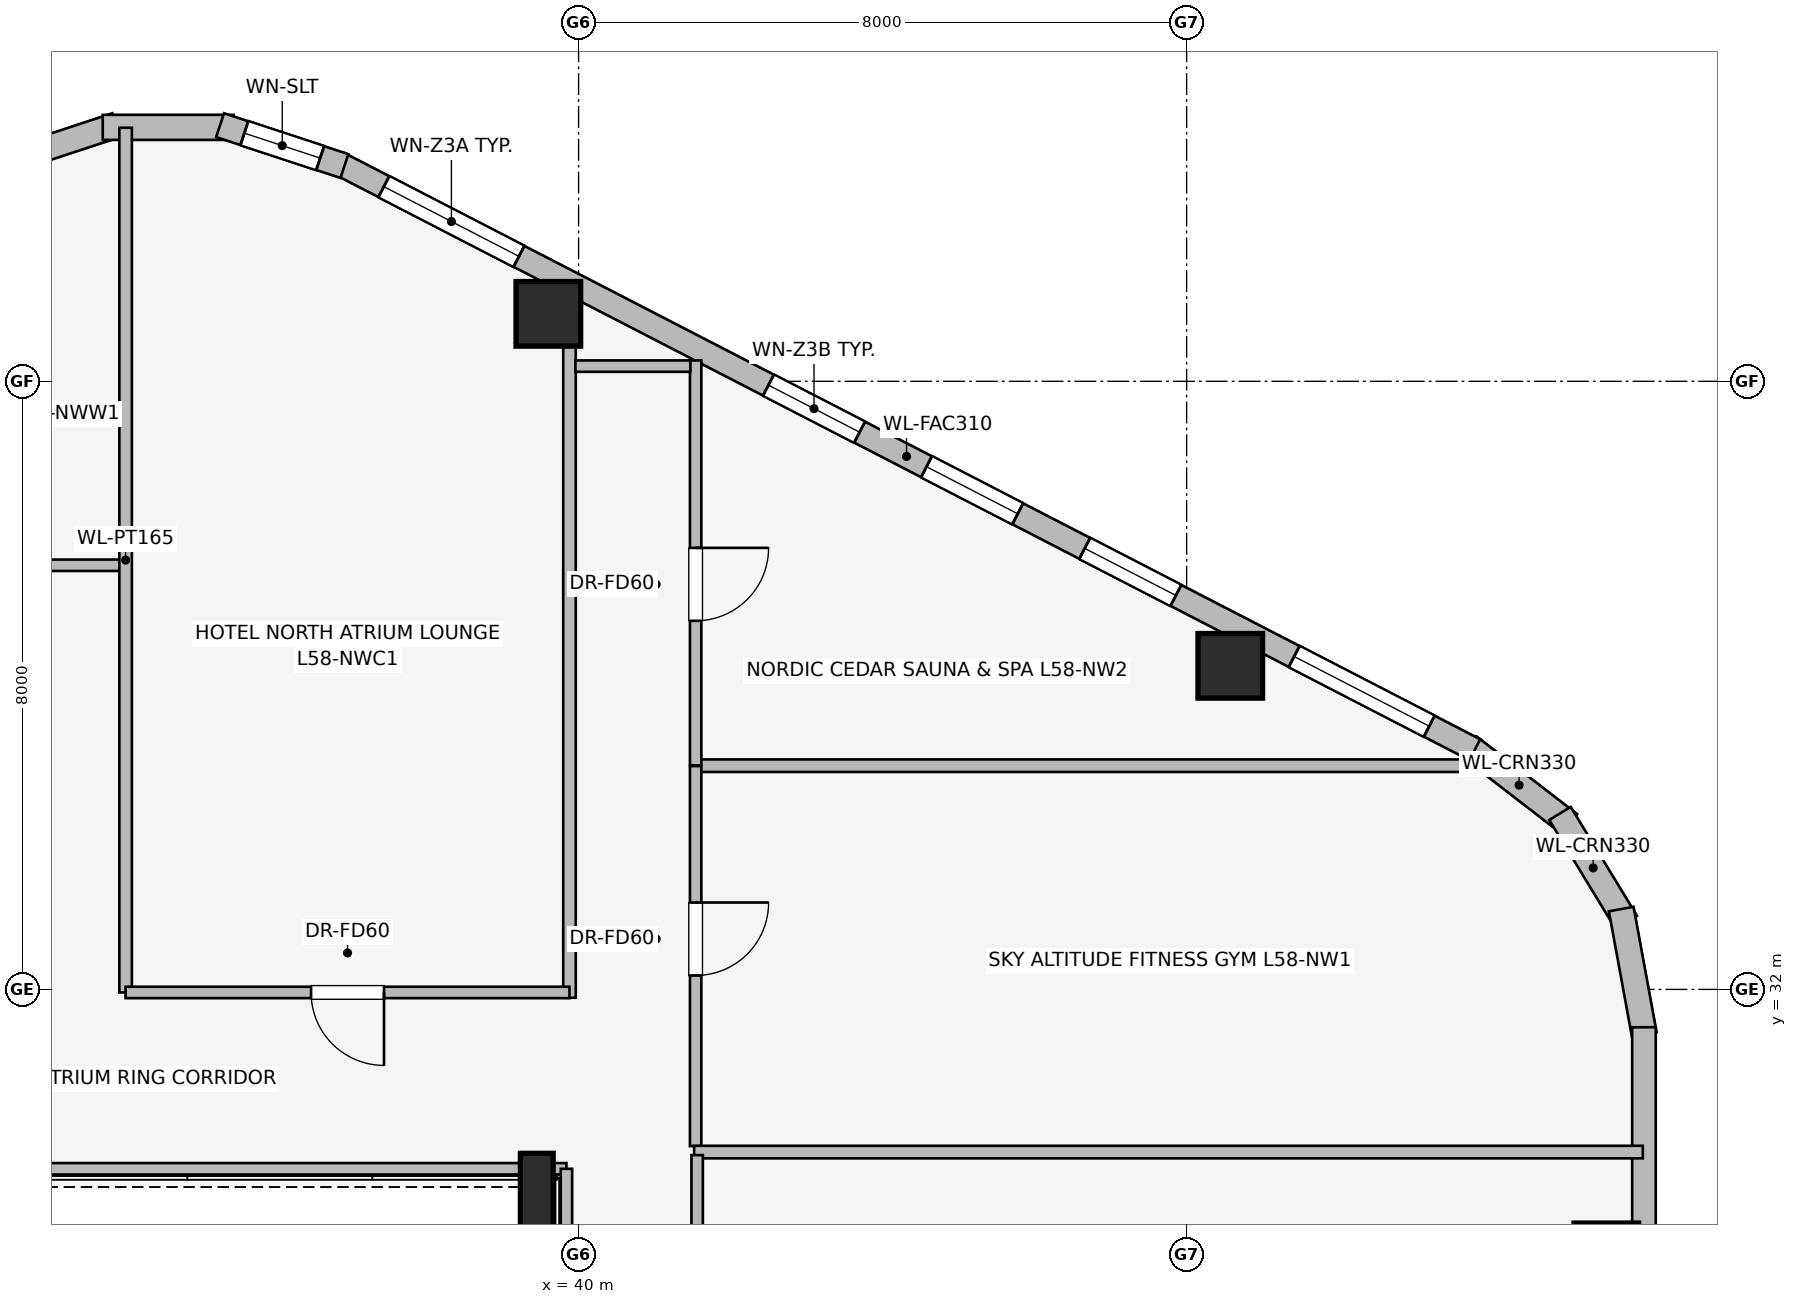
"""IFC4 building model, lengths in metres.
Left out: names, types, materials, properties, quantities, classifications, styles, units other than length and angle.
Written with IfcOpenShell. Run it as: python <this file> out.ifc"""

import sys

from ifc_helpers import new_model, si_unit, direction, frame, frame_2d, origin, origin_2d, place, context, subcontext, project, spatial, rectangle, i_section, extrude, element, fill, save


model = new_model("IFC4")
c1 = context("Model", 3, precision=1e-05, world=origin(), true_north=direction((0.0, 1.0)))
c2 = subcontext(c1, "Body", "Model", "MODEL_VIEW")
j1 = project(units=[si_unit("LENGTHUNIT", "METRE"), si_unit("PLANEANGLEUNIT", "RADIAN")], contexts=[c1])
p1 = place(None, origin())
s1 = spatial("IfcSite", under=j1, at=p1, CompositionType="ELEMENT")
p2 = place(p1, origin())
s2 = spatial("IfcBuilding", under=s1, at=p2, CompositionType="ELEMENT")
p3 = place(p2, frame((0.0, 0.0, 213.7)))
s3 = spatial("IfcBuildingStorey", under=s2, at=p3, CompositionType="ELEMENT", Elevation=213.7)
for number, where, z_axis, x_axis in (
    (1, (48.574, 36.257, 0.0), (0.0, 0.0, 1.0), (1.0, 0.0, 0.0)),
    (2, (39.602, 40.888, 0.0), (0.0, 0.0, 1.0), (1.0, 0.0, 0.0)),
    (3, (53.522, 28.501, 0.0), (0.0, 0.0, 1.0), (1.0, 0.0, 0.0)),
):
    element("IfcColumn", number, at=place(p3, frame(where, z_axis=z_axis, x_axis=x_axis)), inside=s3, PredefinedType="COLUMN", context=c2, shape_type="SweptSolid", body=[
        extrude(rectangle(XDim=0.85, YDim=0.85, at=origin_2d()), origin(), (0.0, 0.0, 1.0), 3.45),
    ])
p4 = place(p3, frame((39.45, 29.35, 0.0), z_axis=(0.0, 0.0, 1.0), x_axis=(1.0, 0.0, 0.0)))
e4 = element("IfcColumn", 4, at=p4, inside=s3, PredefinedType="COLUMN", context=c2, shape_type="SweptSolid", body=[
    extrude(i_section(OverallWidth=0.431, OverallDepth=0.987, WebThickness=0.034, FlangeThickness=0.062, at=origin_2d()), origin(), (0.0, 0.0, 1.0), 3.45),
])
p5 = place(p3, frame((51.711, 35.2, 0.0), z_axis=(0.0, 0.0, 1.0), x_axis=(0.791464279355, -0.611215423976, 0.0)))
e5 = element("IfcWall", 5, at=p5, inside=s3, PredefinedType="STANDARD", context=c2, shape_type="SweptSolid", body=[
    extrude(rectangle(XDim=1.677, YDim=0.33, at=frame_2d((0.838, 0.0))), origin(), (0.0, 0.0, 1.0), 3.19),
])
p6 = place(p3, frame((52.912, 34.315, 0.0), z_axis=(0.0, 0.0, 1.0), x_axis=(0.520219286058, -0.85403272444, 0.0)))
e6 = element("IfcWall", 6, at=p6, inside=s3, PredefinedType="STANDARD", context=c2, shape_type="SweptSolid", body=[
    extrude(rectangle(XDim=1.678, YDim=0.33, at=frame_2d((0.839, 0.0))), origin(), (0.0, 0.0, 1.0), 3.19),
])
p7 = place(p3, frame((53.718, 33.057, 0.0), z_axis=(0.0, 0.0, 1.0), x_axis=(0.180717642671, -0.983535019014, 0.0)))
e7 = element("IfcWall", 7, at=p7, inside=s3, PredefinedType="STANDARD", context=c2, shape_type="SweptSolid", body=[
    extrude(rectangle(XDim=1.677, YDim=0.33, at=frame_2d((0.838, 0.0))), origin(), (0.0, 0.0, 1.0), 3.19),
])
p8 = place(p3, frame((36.838, 42.871, 0.0), z_axis=(0.0, 0.0, 1.0), x_axis=(0.888626188278, -0.458632202867, 0.0)))
e8 = element("IfcWall", 8, at=p8, inside=s3, PredefinedType="STANDARD", context=c2, shape_type="SweptSolid", body=[
    extrude(rectangle(XDim=16.828, YDim=0.31, at=frame_2d((8.414, 0.0))), origin(), (0.0, 0.0, 1.0), 3.19),
])
p9 = place(p8, frame((0.675, 0.0, 0.75)))
e9 = element("IfcOpeningElement", 9, at=p9, cuts=e8, PredefinedType="OPENING", context=c2, shape_type="SweptSolid", body=[
    extrude(rectangle(XDim=2.0, YDim=1.5, at=frame_2d((1.0, 0.75))), frame((0.0, 0.165, 0.0), z_axis=(0.0, -1.0, 0.0), x_axis=(1.0, 0.0, 0.0)), (0.0, 0.0, 1.0), 0.33),
])
p10 = place(p8, frame((6.369, 0.0, 0.75)))
e10 = element("IfcOpeningElement", 10, at=p10, cuts=e8, PredefinedType="OPENING", context=c2, shape_type="SweptSolid", body=[
    extrude(rectangle(XDim=1.35, YDim=1.45, at=frame_2d((0.675, 0.725))), frame((0.0, 0.165, 0.0), z_axis=(0.0, -1.0, 0.0), x_axis=(1.0, 0.0, 0.0)), (0.0, 0.0, 1.0), 0.33),
])
p11 = place(p8, frame((8.71, 0.0, 0.75)))
e11 = element("IfcOpeningElement", 11, at=p11, cuts=e8, PredefinedType="OPENING", context=c2, shape_type="SweptSolid", body=[
    extrude(rectangle(XDim=1.35, YDim=1.45, at=frame_2d((0.675, 0.725))), frame((0.0, 0.165, 0.0), z_axis=(0.0, -1.0, 0.0), x_axis=(1.0, 0.0, 0.0)), (0.0, 0.0, 1.0), 0.33),
])
p12 = place(p8, frame((11.052, 0.0, 0.75)))
e12 = element("IfcOpeningElement", 12, at=p12, cuts=e8, PredefinedType="OPENING", context=c2, shape_type="SweptSolid", body=[
    extrude(rectangle(XDim=1.35, YDim=1.45, at=frame_2d((0.675, 0.725))), frame((0.0, 0.165, 0.0), z_axis=(0.0, -1.0, 0.0), x_axis=(1.0, 0.0, 0.0)), (0.0, 0.0, 1.0), 0.33),
])
p13 = place(p8, frame((14.153, 0.0, 0.75)))
e13 = element("IfcOpeningElement", 13, at=p13, cuts=e8, PredefinedType="OPENING", context=c2, shape_type="SweptSolid", body=[
    extrude(rectangle(XDim=2.0, YDim=1.5, at=frame_2d((1.0, 0.75))), frame((0.0, 0.165, 0.0), z_axis=(0.0, -1.0, 0.0), x_axis=(1.0, 0.0, 0.0)), (0.0, 0.0, 1.0), 0.33),
])
p14 = place(p3, frame((32.281, 42.832, 0.0), z_axis=(0.0, 0.0, 1.0), x_axis=(0.949937416267, 0.312440242569, 0.0)))
e14 = element("IfcWall", 14, at=p14, inside=s3, PredefinedType="STANDARD", context=c2, shape_type="SweptSolid", body=[
    extrude(rectangle(XDim=1.722, YDim=0.33, at=frame_2d((0.861, 0.0))), origin(), (0.0, 0.0, 1.0), 3.19),
])
p15 = place(p3, frame((33.739, 43.341, 0.0), z_axis=(0.0, 0.0, 1.0), x_axis=(1.0, 0.0, 0.0)))
e15 = element("IfcWall", 15, at=p15, inside=s3, PredefinedType="STANDARD", context=c2, shape_type="SweptSolid", body=[
    extrude(rectangle(XDim=1.722, YDim=0.33, at=frame_2d((0.861, 0.0))), origin(), (0.0, 0.0, 1.0), 3.19),
])
p16 = place(p3, frame((35.283, 43.37, 0.0), z_axis=(0.0, 0.0, 1.0), x_axis=(0.949937416267, -0.312440242569, 0.0)))
e16 = element("IfcWall", 16, at=p16, inside=s3, PredefinedType="STANDARD", context=c2, shape_type="SweptSolid", body=[
    extrude(rectangle(XDim=1.722, YDim=0.33, at=frame_2d((0.861, 0.0))), origin(), (0.0, 0.0, 1.0), 3.19),
])
p17 = place(p16, frame((0.336, 0.0, 0.75)))
e17 = element("IfcOpeningElement", 17, at=p17, cuts=e16, PredefinedType="OPENING", context=c2, shape_type="SweptSolid", body=[
    extrude(rectangle(XDim=1.05, YDim=1.4, at=frame_2d((0.525, 0.7))), frame((0.0, 0.175, 0.0), z_axis=(0.0, -1.0, 0.0), x_axis=(1.0, 0.0, 0.0)), (0.0, 0.0, 1.0), 0.35),
])
p18 = place(p3, frame((54.017, 31.502, 0.0), z_axis=(0.0, 0.0, 1.0), x_axis=(0.0, -1.0, 0.0)))
e18 = element("IfcWall", 18, at=p18, inside=s3, PredefinedType="STANDARD", context=c2, shape_type="SweptSolid", body=[
    extrude(rectangle(XDim=15.004, YDim=0.31, at=frame_2d((7.502, 0.0))), origin(), (0.0, 0.0, 1.0), 3.19),
])
p19 = place(p18, frame((6.552, 0.0, 0.0)))
e19 = element("IfcOpeningElement", 19, at=p19, cuts=e18, PredefinedType="OPENING", context=c2, shape_type="SweptSolid", body=[
    extrude(rectangle(XDim=1.1, YDim=2.04, at=frame_2d((0.55, 1.02))), frame((0.0, 0.165, 0.0), z_axis=(0.0, -1.0, 0.0), x_axis=(1.0, 0.0, 0.0)), (0.0, 0.0, 1.0), 0.33),
])
p20 = place(p18, frame((3.899, 0.0, 0.75)))
e20 = element("IfcOpeningElement", 20, at=p20, cuts=e18, PredefinedType="OPENING", context=c2, shape_type="SweptSolid", body=[
    extrude(rectangle(XDim=2.0, YDim=1.5, at=frame_2d((1.0, 0.75))), frame((0.0, 0.165, 0.0), z_axis=(0.0, -1.0, 0.0), x_axis=(1.0, 0.0, 0.0)), (0.0, 0.0, 1.0), 0.33),
])
p21 = place(p18, frame((9.093, 0.0, 0.75)))
e21 = element("IfcOpeningElement", 21, at=p21, cuts=e18, PredefinedType="OPENING", context=c2, shape_type="SweptSolid", body=[
    extrude(rectangle(XDim=1.35, YDim=1.45, at=frame_2d((0.675, 0.725))), frame((0.0, 0.165, 0.0), z_axis=(0.0, -1.0, 0.0), x_axis=(1.0, 0.0, 0.0)), (0.0, 0.0, 1.0), 0.33),
])
p22 = place(p3, frame((39.84, 29.64, 0.0), z_axis=(0.0, 0.0, 1.0), x_axis=(-1.0, 0.0, 0.0)))
e22 = element("IfcWall", 22, at=p22, inside=s3, PredefinedType="PARTITIONING", context=c2, shape_type="SweptSolid", body=[
    extrude(rectangle(XDim=12.203, YDim=0.15, at=frame_2d((6.102, 0.0))), origin(), (0.0, 0.0, 1.0), 2.331),
])
p23 = place(p3, frame((39.84, 18.36, 0.0), z_axis=(0.0, 0.0, 1.0), x_axis=(0.0, 1.0, 0.0)))
e23 = element("IfcWall", 23, at=p23, inside=s3, PredefinedType="PARTITIONING", context=c2, shape_type="SweptSolid", body=[
    extrude(rectangle(XDim=11.28, YDim=0.15, at=frame_2d((5.64, 0.0))), origin(), (0.0, 0.0, 1.0), 3.19),
])
p24 = place(p3, frame((34.0, 37.58, 0.0), z_axis=(0.0, 0.0, 1.0), x_axis=(-1.0, 0.0, 0.0)))
e24 = element("IfcWall", 24, at=p24, inside=s3, PredefinedType="PARTITIONING", context=c2, shape_type="SweptSolid", body=[
    extrude(rectangle(XDim=12.075, YDim=0.15, at=frame_2d((6.038, 0.0))), origin(), (0.0, 0.0, 1.0), 2.582),
])
p25 = place(p24, frame((5.195, 0.0, 0.0)))
e25 = element("IfcOpeningElement", 25, at=p25, cuts=e24, PredefinedType="OPENING", context=c2, shape_type="SweptSolid", body=[
    extrude(rectangle(XDim=0.96, YDim=2.0, at=frame_2d((0.48, 1.0))), frame((0.0, 0.085, 0.0), z_axis=(0.0, -1.0, 0.0), x_axis=(1.0, 0.0, 0.0)), (0.0, 0.0, 1.0), 0.17),
])
p26 = place(p3, frame((34.04, 31.96, 0.0), z_axis=(0.0, 0.0, 1.0), x_axis=(0.0, 1.0, 0.0)))
e26 = element("IfcWall", 26, at=p26, inside=s3, PredefinedType="PARTITIONING", context=c2, shape_type="SweptSolid", body=[
    extrude(rectangle(XDim=11.376, YDim=0.165, at=frame_2d((5.688, 0.0))), origin(), (0.0, 0.0, 1.0), 3.19),
])
p27 = place(p3, frame((39.88, 31.89, 0.0), z_axis=(0.0, 0.0, 1.0), x_axis=(0.0, 1.0, 0.0)))
e27 = element("IfcWall", 27, at=p27, inside=s3, PredefinedType="PARTITIONING", context=c2, shape_type="SweptSolid", body=[
    extrude(rectangle(XDim=9.406, YDim=0.165, at=frame_2d((4.703, 0.0))), origin(), (0.0, 0.0, 1.0), 2.497),
])
p28 = place(p3, frame((39.88, 31.96, 0.0), z_axis=(0.0, 0.0, 1.0), x_axis=(-1.0, 0.0, 0.0)))
e28 = element("IfcWall", 28, at=p28, inside=s3, PredefinedType="PARTITIONING", context=c2, shape_type="SweptSolid", body=[
    extrude(rectangle(XDim=5.84, YDim=0.15, at=frame_2d((2.92, 0.0))), origin(), (0.0, 0.0, 1.0), 3.19),
])
p29 = place(p28, frame((2.44, 0.0, 0.0)))
e29 = element("IfcOpeningElement", 29, at=p29, cuts=e28, PredefinedType="OPENING", context=c2, shape_type="SweptSolid", body=[
    extrude(rectangle(XDim=0.96, YDim=2.0, at=frame_2d((0.48, 1.0))), frame((0.0, 0.085, 0.0), z_axis=(0.0, -1.0, 0.0), x_axis=(1.0, 0.0, 0.0)), (0.0, 0.0, 1.0), 0.17),
])
p30 = place(p3, frame((41.55, 34.943, 0.0), z_axis=(0.0, 0.0, 1.0), x_axis=(1.0, 0.0, 0.0)))
e30 = element("IfcWall", 30, at=p30, inside=s3, PredefinedType="PARTITIONING", context=c2, shape_type="SweptSolid", body=[
    extrude(rectangle(XDim=10.485, YDim=0.165, at=frame_2d((5.242, 0.0))), origin(), (0.0, 0.0, 1.0), 3.19),
])
p31 = place(p3, frame((41.54, 34.938, 0.0), z_axis=(0.0, 0.0, 1.0), x_axis=(0.0, -1.0, 0.0)))
e31 = element("IfcWall", 31, at=p31, inside=s3, PredefinedType="PARTITIONING", context=c2, shape_type="SweptSolid", body=[
    extrude(rectangle(XDim=5.0, YDim=0.15, at=frame_2d((2.5, 0.0))), origin(), (0.0, 0.0, 1.0), 3.19),
])
p32 = place(p31, frame((1.795, 0.0, 0.0)))
e32 = element("IfcOpeningElement", 32, at=p32, cuts=e31, PredefinedType="OPENING", context=c2, shape_type="SweptSolid", body=[
    extrude(rectangle(XDim=0.96, YDim=2.0, at=frame_2d((0.48, 1.0))), frame((0.0, 0.085, 0.0), z_axis=(0.0, -1.0, 0.0), x_axis=(1.0, 0.0, 0.0)), (0.0, 0.0, 1.0), 0.17),
])
p33 = place(p3, frame((41.54, 40.275, 0.0), z_axis=(0.0, 0.0, 1.0), x_axis=(0.0, -1.0, 0.0)))
e33 = element("IfcWall", 33, at=p33, inside=s3, PredefinedType="PARTITIONING", context=c2, shape_type="SweptSolid", body=[
    extrude(rectangle(XDim=5.327, YDim=0.15, at=frame_2d((2.664, 0.0))), origin(), (0.0, 0.0, 1.0), 3.19),
])
p34 = place(p33, frame((2.466, 0.0, 0.0)))
e34 = element("IfcOpeningElement", 34, at=p34, cuts=e33, PredefinedType="OPENING", context=c2, shape_type="SweptSolid", body=[
    extrude(rectangle(XDim=0.96, YDim=2.0, at=frame_2d((0.48, 1.0))), frame((0.0, 0.085, 0.0), z_axis=(0.0, -1.0, 0.0), x_axis=(1.0, 0.0, 0.0)), (0.0, 0.0, 1.0), 0.17),
])
p35 = place(p3, frame((41.52, 29.86, 0.0), z_axis=(0.0, 0.0, 1.0), x_axis=(1.0, 0.0, 0.0)))
e35 = element("IfcWall", 35, at=p35, inside=s3, PredefinedType="PARTITIONING", context=c2, shape_type="SweptSolid", body=[
    extrude(rectangle(XDim=12.482, YDim=0.165, at=frame_2d((6.241, 0.0))), origin(), (0.0, 0.0, 1.0), 3.19),
])
p36 = place(p3, frame((41.56, 23.785, 0.0), z_axis=(0.0, 0.0, 1.0), x_axis=(0.0, 1.0, 0.0)))
e36 = element("IfcWall", 36, at=p36, inside=s3, PredefinedType="PARTITIONING", context=c2, shape_type="SweptSolid", body=[
    extrude(rectangle(XDim=6.035, YDim=0.15, at=frame_2d((3.018, 0.0))), origin(), (0.0, 0.0, 1.0), 3.19),
])
p37 = place(p36, frame((2.538, 0.0, 0.0)))
e37 = element("IfcOpeningElement", 37, at=p37, cuts=e36, PredefinedType="OPENING", context=c2, shape_type="SweptSolid", body=[
    extrude(rectangle(XDim=0.96, YDim=2.0, at=frame_2d((0.48, 1.0))), frame((0.0, 0.085, 0.0), z_axis=(0.0, -1.0, 0.0), x_axis=(1.0, 0.0, 0.0)), (0.0, 0.0, 1.0), 0.17),
])
p38 = place(p3, frame((39.958, 40.2, 0.0), z_axis=(0.0, 0.0, 1.0), x_axis=(1.0, 0.0, 0.0)))
e38 = element("IfcWall", 38, at=p38, inside=s3, PredefinedType="PARTITIONING", context=c2, shape_type="SweptSolid", body=[
    extrude(rectangle(XDim=1.512, YDim=0.15, at=frame_2d((0.756, 0.0))), origin(), (0.0, 0.0, 1.0), 3.19),
])
p39 = place(p9, origin())
e39 = element("IfcWindow", 39, at=p39, inside=s3, PartitioningType="SINGLE_PANEL", PredefinedType="WINDOW", context=c2, shape_type="SweptSolid", body=[
    extrude(rectangle(XDim=2.0, YDim=1.5, at=frame_2d((1.0, 0.75))), frame((0.0, 0.03, 0.0), z_axis=(0.0, -1.0, 0.0), x_axis=(1.0, 0.0, 0.0)), (0.0, 0.0, 1.0), 0.06),
])
fill(e9, e39)
p40 = place(p10, origin())
e40 = element("IfcWindow", 40, at=p40, inside=s3, PartitioningType="SINGLE_PANEL", PredefinedType="WINDOW", context=c2, shape_type="SweptSolid", body=[
    extrude(rectangle(XDim=1.35, YDim=1.45, at=frame_2d((0.675, 0.725))), frame((0.0, 0.03, 0.0), z_axis=(0.0, -1.0, 0.0), x_axis=(1.0, 0.0, 0.0)), (0.0, 0.0, 1.0), 0.06),
])
fill(e10, e40)
p41 = place(p11, origin())
e41 = element("IfcWindow", 41, at=p41, inside=s3, PartitioningType="SINGLE_PANEL", PredefinedType="WINDOW", context=c2, shape_type="SweptSolid", body=[
    extrude(rectangle(XDim=1.35, YDim=1.45, at=frame_2d((0.675, 0.725))), frame((0.0, 0.03, 0.0), z_axis=(0.0, -1.0, 0.0), x_axis=(1.0, 0.0, 0.0)), (0.0, 0.0, 1.0), 0.06),
])
fill(e11, e41)
p42 = place(p12, origin())
e42 = element("IfcWindow", 42, at=p42, inside=s3, PartitioningType="SINGLE_PANEL", PredefinedType="WINDOW", context=c2, shape_type="SweptSolid", body=[
    extrude(rectangle(XDim=1.35, YDim=1.45, at=frame_2d((0.675, 0.725))), frame((0.0, 0.03, 0.0), z_axis=(0.0, -1.0, 0.0), x_axis=(1.0, 0.0, 0.0)), (0.0, 0.0, 1.0), 0.06),
])
fill(e12, e42)
p43 = place(p13, origin())
e43 = element("IfcWindow", 43, at=p43, inside=s3, PartitioningType="SINGLE_PANEL", PredefinedType="WINDOW", context=c2, shape_type="SweptSolid", body=[
    extrude(rectangle(XDim=2.0, YDim=1.5, at=frame_2d((1.0, 0.75))), frame((0.0, 0.03, 0.0), z_axis=(0.0, -1.0, 0.0), x_axis=(1.0, 0.0, 0.0)), (0.0, 0.0, 1.0), 0.06),
])
fill(e13, e43)
p44 = place(p17, origin())
e44 = element("IfcWindow", 44, at=p44, inside=s3, PartitioningType="SINGLE_PANEL", PredefinedType="WINDOW", context=c2, shape_type="SweptSolid", body=[
    extrude(rectangle(XDim=1.05, YDim=1.4, at=frame_2d((0.525, 0.7))), frame((0.0, 0.03, 0.0), z_axis=(0.0, -1.0, 0.0), x_axis=(1.0, 0.0, 0.0)), (0.0, 0.0, 1.0), 0.06),
])
fill(e17, e44)
p45 = place(p29, origin())
e45 = element("IfcDoor", 45, at=p45, inside=s3, OperationType="SINGLE_SWING_LEFT", PredefinedType="DOOR", context=c2, shape_type="SweptSolid", body=[
    extrude(rectangle(XDim=0.96, YDim=2.0, at=frame_2d((0.48, 1.0))), frame((0.0, 0.025, 0.0), z_axis=(0.0, -1.0, 0.0), x_axis=(1.0, 0.0, 0.0)), (0.0, 0.0, 1.0), 0.05),
])
fill(e29, e45)
p46 = place(p32, origin())
e46 = element("IfcDoor", 46, at=p46, inside=s3, OperationType="SINGLE_SWING_LEFT", PredefinedType="DOOR", context=c2, shape_type="SweptSolid", body=[
    extrude(rectangle(XDim=0.96, YDim=2.0, at=frame_2d((0.48, 1.0))), frame((0.0, 0.025, 0.0), z_axis=(0.0, -1.0, 0.0), x_axis=(1.0, 0.0, 0.0)), (0.0, 0.0, 1.0), 0.05),
])
fill(e32, e46)
p47 = place(p34, origin())
e47 = element("IfcDoor", 47, at=p47, inside=s3, OperationType="SINGLE_SWING_LEFT", PredefinedType="DOOR", context=c2, shape_type="SweptSolid", body=[
    extrude(rectangle(XDim=0.96, YDim=2.0, at=frame_2d((0.48, 1.0))), frame((0.0, 0.025, 0.0), z_axis=(0.0, -1.0, 0.0), x_axis=(1.0, 0.0, 0.0)), (0.0, 0.0, 1.0), 0.05),
])
fill(e34, e47)
save(model, sys.argv[1])
